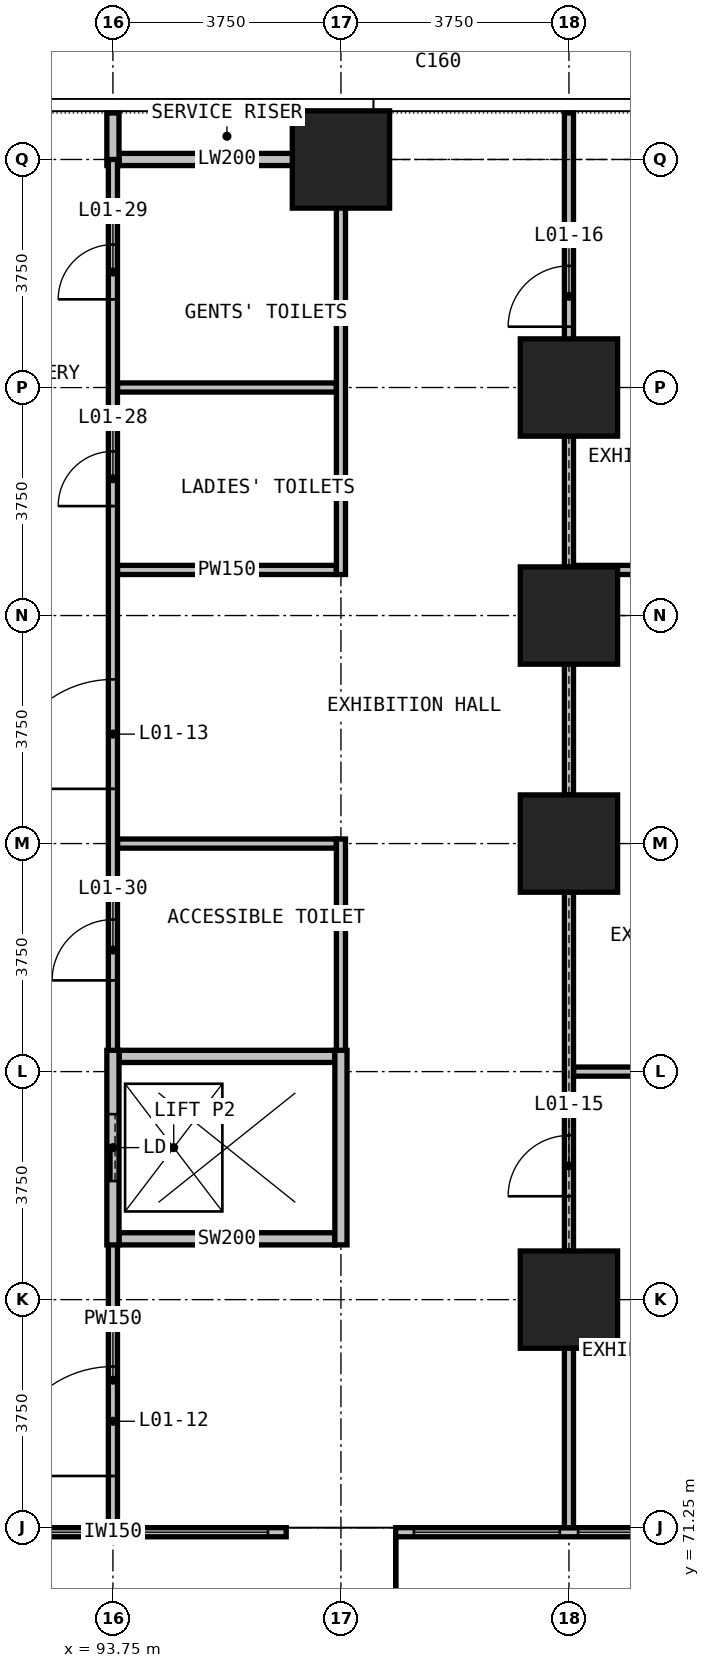
"""IFC4 building model, lengths in metres.
Left out: names, types, materials, properties, quantities, classifications, styles, units other than length and angle.
Written with IfcOpenShell. Run it as: python <this file> out.ifc"""

import sys

from ifc_helpers import new_model, si_unit, direction, frame, frame_2d, origin, origin_2d, place, context, subcontext, project, spatial, polyline, rectangle, outline, extrude, element, fill, save


model = new_model("IFC4")
c1 = context("Model", 3, precision=1e-05, world=origin(), true_north=direction((0.0, 1.0)))
c2 = subcontext(c1, "Body", "Model", "MODEL_VIEW")
j1 = project(units=[si_unit("LENGTHUNIT", "METRE"), si_unit("PLANEANGLEUNIT", "RADIAN")], contexts=[c1])
p1 = place(None, origin())
s1 = spatial("IfcSite", under=j1, at=p1, CompositionType="ELEMENT")
p2 = place(p1, origin())
s2 = spatial("IfcBuilding", under=s1, at=p2, CompositionType="ELEMENT")
p3 = place(p2, frame((0.0, 0.0, 7.5)))
s3 = spatial("IfcBuildingStorey", under=s2, at=p3, CompositionType="ELEMENT", Elevation=7.5)
p4 = place(p3, frame((98.4, 66.562, 0.84), z_axis=(1.0, 0.0, 0.0), x_axis=(0.0, 0.371855891589, -0.928290469568)))
e1 = element("IfcWall", 1, at=p4, inside=s3, PredefinedType="SHEAR", context=c2, shape_type="SweptSolid", body=[
    extrude(outline(polyline([(0.0, 0.0), (0.905, 0.0), (2.523, 4.039), (-5.832, 7.386), (-9.19, -0.996), (-8.194, -0.757), (-6.429, -0.454), (-4.475, -0.227), (-2.332, -0.076), (0.0, 0.0)])), origin(), (0.0, 0.0, -1.0), 1.8),
])
for number, where, z_axis, x_axis in (
    (2, (97.5, 93.75, 0.0), (0.0, 0.0, 1.0), (1.0, 0.0, 0.0)),
    (3, (101.25, 75.0, 0.0), (0.0, 0.0, 1.0), (1.0, 0.0, 0.0)),
    (4, (101.25, 82.5, 0.0), (0.0, 0.0, 1.0), (1.0, 0.0, 0.0)),
    (5, (101.25, 86.25, 0.0), (0.0, 0.0, 1.0), (1.0, 0.0, 0.0)),
    (6, (101.25, 90.0, 0.0), (0.0, 0.0, 1.0), (1.0, 0.0, 0.0)),
):
    element("IfcColumn", number, at=place(p3, frame(where, z_axis=z_axis, x_axis=x_axis)), inside=s3, PredefinedType="COLUMN", context=c2, shape_type="SweptSolid", body=[
        extrude(rectangle(XDim=1.6, YDim=1.6, at=origin_2d()), origin(), (0.0, 0.0, 1.0), 9.0),
    ])
p5 = place(p3, frame((90.9, 71.175, 0.0), z_axis=(0.0, 0.0, 1.0), x_axis=(1.0, 0.0, 0.0)))
e7 = element("IfcWall", 7, at=p5, inside=s3, PredefinedType="SOLIDWALL", context=c2, shape_type="SweptSolid", body=[
    extrude(rectangle(XDim=5.7, YDim=0.15, at=frame_2d((2.85, 0.0))), origin(), (0.0, 0.0, 1.0), 8.65),
])
p6 = place(p5, frame((0.3, 0.0, 0.9)))
e8 = element("IfcOpeningElement", 8, at=p6, cuts=e7, PredefinedType="OPENING", context=c2, shape_type="SweptSolid", body=[
    extrude(rectangle(XDim=2.4, YDim=3.6, at=frame_2d((1.2, 1.8))), frame((0.0, 0.085, 0.0), z_axis=(0.0, -1.0, 0.0), x_axis=(1.0, 0.0, 0.0)), (0.0, 0.0, 1.0), 0.17),
])
p7 = place(p5, frame((3.0, 0.0, 0.9)))
e9 = element("IfcOpeningElement", 9, at=p7, cuts=e7, PredefinedType="OPENING", context=c2, shape_type="SweptSolid", body=[
    extrude(rectangle(XDim=2.4, YDim=3.6, at=frame_2d((1.2, 1.8))), frame((0.0, 0.085, 0.0), z_axis=(0.0, -1.0, 0.0), x_axis=(1.0, 0.0, 0.0)), (0.0, 0.0, 1.0), 0.17),
])
p8 = place(p3, frame((98.4, 71.175, 0.0), z_axis=(0.0, 0.0, 1.0), x_axis=(1.0, 0.0, 0.0)))
e10 = element("IfcWall", 10, at=p8, inside=s3, PredefinedType="SOLIDWALL", context=c2, shape_type="SweptSolid", body=[
    extrude(rectangle(XDim=5.7, YDim=0.15, at=frame_2d((2.85, 0.0))), origin(), (0.0, 0.0, 1.0), 8.65),
])
p9 = place(p8, frame((0.3, 0.0, 0.9)))
e11 = element("IfcOpeningElement", 11, at=p9, cuts=e10, PredefinedType="OPENING", context=c2, shape_type="SweptSolid", body=[
    extrude(rectangle(XDim=2.4, YDim=3.6, at=frame_2d((1.2, 1.8))), frame((0.0, 0.085, 0.0), z_axis=(0.0, -1.0, 0.0), x_axis=(1.0, 0.0, 0.0)), (0.0, 0.0, 1.0), 0.17),
])
p10 = place(p8, frame((3.0, 0.0, 0.9)))
e12 = element("IfcOpeningElement", 12, at=p10, cuts=e10, PredefinedType="OPENING", context=c2, shape_type="SweptSolid", body=[
    extrude(rectangle(XDim=2.4, YDim=3.6, at=frame_2d((1.2, 1.8))), frame((0.0, 0.085, 0.0), z_axis=(0.0, -1.0, 0.0), x_axis=(1.0, 0.0, 0.0)), (0.0, 0.0, 1.0), 0.17),
])
p11 = place(p3, frame((93.85, 93.75, 0.0), z_axis=(0.0, 0.0, 1.0), x_axis=(1.0, 0.0, 0.0)))
e13 = element("IfcWall", 13, at=p11, inside=s3, PredefinedType="PARTITIONING", context=c2, shape_type="SweptSolid", body=[
    extrude(rectangle(XDim=3.55, YDim=0.2, at=frame_2d((1.775, 0.0))), origin(), (0.0, 0.0, 1.0), 8.65),
])
for number, where, z_axis, x_axis in (
    (14, (93.75, 93.65, 0.0), (0.0, 0.0, 1.0), (0.0, 1.0, 0.0)),
    (15, (97.5, 93.65, 0.0), (0.0, 0.0, 1.0), (0.0, 1.0, 0.0)),
):
    element("IfcWall", number, at=place(p3, frame(where, z_axis=z_axis, x_axis=x_axis)), inside=s3, PredefinedType="PARTITIONING", context=c2, shape_type="SweptSolid", body=[
        extrude(rectangle(XDim=0.865, YDim=0.2, at=frame_2d((0.433, 0.0))), origin(), (0.0, 0.0, 1.0), 8.65),
    ])
p12 = place(p3, frame((101.325, 78.75, 0.0), z_axis=(0.0, 0.0, 1.0), x_axis=(1.0, 0.0, 0.0)))
e16 = element("IfcWall", 16, at=p12, inside=s3, PredefinedType="PARTITIONING", context=c2, shape_type="SweptSolid", body=[
    extrude(rectangle(XDim=5.05, YDim=0.15, at=frame_2d((2.525, 0.0))), origin(), (0.0, 0.0, 1.0), 8.65),
])
for number, where, z_axis, x_axis in (
    (17, (93.825, 82.5, 0.0), (0.0, 0.0, 1.0), (1.0, 0.0, 0.0)),
    (18, (93.825, 87.0, 0.0), (0.0, 0.0, 1.0), (1.0, 0.0, 0.0)),
):
    element("IfcWall", number, at=place(p3, frame(where, z_axis=z_axis, x_axis=x_axis)), inside=s3, PredefinedType="PARTITIONING", context=c2, shape_type="SweptSolid", body=[
        extrude(rectangle(XDim=3.6, YDim=0.15, at=frame_2d((1.8, 0.0))), origin(), (0.0, 0.0, 1.0), 8.65),
    ])
p13 = place(p3, frame((101.325, 87.0, 0.0), z_axis=(0.0, 0.0, 1.0), x_axis=(1.0, 0.0, 0.0)))
e19 = element("IfcWall", 19, at=p13, inside=s3, PredefinedType="PARTITIONING", context=c2, shape_type="SweptSolid", body=[
    extrude(rectangle(XDim=3.575, YDim=0.15, at=frame_2d((1.788, 0.0))), origin(), (0.0, 0.0, 1.0), 8.65),
])
p14 = place(p3, frame((93.825, 90.0, 0.0), z_axis=(0.0, 0.0, 1.0), x_axis=(1.0, 0.0, 0.0)))
e20 = element("IfcWall", 20, at=p14, inside=s3, PredefinedType="PARTITIONING", context=c2, shape_type="SweptSolid", body=[
    extrude(rectangle(XDim=3.6, YDim=0.15, at=frame_2d((1.8, 0.0))), origin(), (0.0, 0.0, 1.0), 8.65),
])
p15 = place(p3, frame((93.75, 71.25, 0.0), z_axis=(0.0, 0.0, 1.0), x_axis=(0.0, 1.0, 0.0)))
e21 = element("IfcWall", 21, at=p15, inside=s3, PredefinedType="PARTITIONING", context=c2, shape_type="SweptSolid", body=[
    extrude(rectangle(XDim=4.85, YDim=0.15, at=frame_2d((2.425, 0.0))), origin(), (0.0, 0.0, 1.0), 8.65),
])
p16 = place(p15, frame((0.85, 0.0, 0.0)))
e22 = element("IfcOpeningElement", 22, at=p16, cuts=e21, PredefinedType="OPENING", context=c2, shape_type="SweptSolid", body=[
    extrude(rectangle(XDim=1.8, YDim=2.2, at=frame_2d((0.9, 1.1))), frame((0.0, 0.085, 0.0), z_axis=(0.0, -1.0, 0.0), x_axis=(1.0, 0.0, 0.0)), (0.0, 0.0, 1.0), 0.17),
])
p17 = place(p3, frame((93.75, 78.9, 0.0), z_axis=(0.0, 0.0, 1.0), x_axis=(0.0, 1.0, 0.0)))
e23 = element("IfcWall", 23, at=p17, inside=s3, PredefinedType="PARTITIONING", context=c2, shape_type="SweptSolid", body=[
    extrude(rectangle(XDim=14.85, YDim=0.15, at=frame_2d((7.425, 0.0))), origin(), (0.0, 0.0, 1.0), 8.65),
])
p18 = place(p17, frame((4.5, 0.0, 0.0)))
e24 = element("IfcOpeningElement", 24, at=p18, cuts=e23, PredefinedType="OPENING", context=c2, shape_type="SweptSolid", body=[
    extrude(rectangle(XDim=1.8, YDim=2.2, at=frame_2d((0.9, 1.1))), frame((0.0, 0.085, 0.0), z_axis=(0.0, -1.0, 0.0), x_axis=(1.0, 0.0, 0.0)), (0.0, 0.0, 1.0), 0.17),
])
p19 = place(p17, frame((9.15, 0.0, 0.0)))
e25 = element("IfcOpeningElement", 25, at=p19, cuts=e23, PredefinedType="OPENING", context=c2, shape_type="SweptSolid", body=[
    extrude(rectangle(XDim=0.9, YDim=2.2, at=frame_2d((0.45, 1.1))), frame((0.0, 0.085, 0.0), z_axis=(0.0, -1.0, 0.0), x_axis=(1.0, 0.0, 0.0)), (0.0, 0.0, 1.0), 0.17),
])
p20 = place(p17, frame((12.55, 0.0, 0.0)))
e26 = element("IfcOpeningElement", 26, at=p20, cuts=e23, PredefinedType="OPENING", context=c2, shape_type="SweptSolid", body=[
    extrude(rectangle(XDim=0.9, YDim=2.2, at=frame_2d((0.45, 1.1))), frame((0.0, 0.085, 0.0), z_axis=(0.0, -1.0, 0.0), x_axis=(1.0, 0.0, 0.0)), (0.0, 0.0, 1.0), 0.17),
])
p21 = place(p17, frame((1.35, 0.0, 0.0)))
e27 = element("IfcOpeningElement", 27, at=p21, cuts=e23, PredefinedType="OPENING", context=c2, shape_type="SweptSolid", body=[
    extrude(rectangle(XDim=1.0, YDim=2.2, at=frame_2d((0.5, 1.1))), frame((0.0, 0.085, 0.0), z_axis=(0.0, -1.0, 0.0), x_axis=(1.0, 0.0, 0.0)), (0.0, 0.0, 1.0), 0.17),
])
p22 = place(p3, frame((97.5, 78.9, 0.0), z_axis=(0.0, 0.0, 1.0), x_axis=(0.0, 1.0, 0.0)))
e28 = element("IfcWall", 28, at=p22, inside=s3, PredefinedType="PARTITIONING", context=c2, shape_type="SweptSolid", body=[
    extrude(rectangle(XDim=3.675, YDim=0.15, at=frame_2d((1.837, 0.0))), origin(), (0.0, 0.0, 1.0), 8.65),
])
p23 = place(p3, frame((97.5, 86.925, 0.0), z_axis=(0.0, 0.0, 1.0), x_axis=(0.0, 1.0, 0.0)))
e29 = element("IfcWall", 29, at=p23, inside=s3, PredefinedType="PARTITIONING", context=c2, shape_type="SweptSolid", body=[
    extrude(rectangle(XDim=6.825, YDim=0.15, at=frame_2d((3.413, 0.0))), origin(), (0.0, 0.0, 1.0), 8.65),
])
p24 = place(p3, frame((101.25, 71.25, 0.0), z_axis=(0.0, 0.0, 1.0), x_axis=(0.0, 1.0, 0.0)))
e30 = element("IfcWall", 30, at=p24, inside=s3, PredefinedType="PARTITIONING", context=c2, shape_type="SweptSolid", body=[
    extrude(rectangle(XDim=4.549, YDim=0.15, at=frame_2d((2.274, 0.0))), origin(), (0.0, 0.0, 1.0), 8.65),
])
p25 = place(p3, frame((101.25, 75.799, 0.0), z_axis=(0.0, 0.0, 1.0), x_axis=(0.0, 1.0, 0.0)))
e31 = element("IfcWall", 31, at=p25, inside=s3, PredefinedType="PARTITIONING", context=c2, shape_type="SweptSolid", body=[
    extrude(rectangle(XDim=5.902, YDim=0.15, at=frame_2d((2.951, 0.0))), origin(), (0.0, 0.0, 1.0), 7.85),
])
p26 = place(p25, frame((0.901, 0.0, 0.0)))
e32 = element("IfcOpeningElement", 32, at=p26, cuts=e31, PredefinedType="OPENING", context=c2, shape_type="SweptSolid", body=[
    extrude(rectangle(XDim=1.0, YDim=2.2, at=frame_2d((0.5, 1.1))), frame((0.0, 0.085, 0.0), z_axis=(0.0, -1.0, 0.0), x_axis=(1.0, 0.0, 0.0)), (0.0, 0.0, 1.0), 0.17),
])
p27 = place(p3, frame((101.25, 81.701, 0.0), z_axis=(0.0, 0.0, 1.0), x_axis=(0.0, 1.0, 0.0)))
e33 = element("IfcWall", 33, at=p27, inside=s3, PredefinedType="PARTITIONING", context=c2, shape_type="SweptSolid", body=[
    extrude(rectangle(XDim=1.598, YDim=0.15, at=frame_2d((0.799, 0.0))), origin(), (0.0, 0.0, 1.0), 8.65),
])
p28 = place(p3, frame((101.25, 83.299, 0.0), z_axis=(0.0, 0.0, 1.0), x_axis=(0.0, 1.0, 0.0)))
e34 = element("IfcWall", 34, at=p28, inside=s3, PredefinedType="PARTITIONING", context=c2, shape_type="SweptSolid", body=[
    extrude(rectangle(XDim=2.152, YDim=0.15, at=frame_2d((1.076, 0.0))), origin(), (0.0, 0.0, 1.0), 7.85),
])
p29 = place(p3, frame((101.25, 85.451, 0.0), z_axis=(0.0, 0.0, 1.0), x_axis=(0.0, 1.0, 0.0)))
e35 = element("IfcWall", 35, at=p29, inside=s3, PredefinedType="PARTITIONING", context=c2, shape_type="SweptSolid", body=[
    extrude(rectangle(XDim=1.598, YDim=0.15, at=frame_2d((0.799, 0.0))), origin(), (0.0, 0.0, 1.0), 8.65),
])
p30 = place(p3, frame((101.25, 87.049, 0.0), z_axis=(0.0, 0.0, 1.0), x_axis=(0.0, 1.0, 0.0)))
e36 = element("IfcWall", 36, at=p30, inside=s3, PredefinedType="PARTITIONING", context=c2, shape_type="SweptSolid", body=[
    extrude(rectangle(XDim=2.152, YDim=0.15, at=frame_2d((1.076, 0.0))), origin(), (0.0, 0.0, 1.0), 7.85),
])
p31 = place(p3, frame((101.25, 89.201, 0.0), z_axis=(0.0, 0.0, 1.0), x_axis=(0.0, 1.0, 0.0)))
e37 = element("IfcWall", 37, at=p31, inside=s3, PredefinedType="PARTITIONING", context=c2, shape_type="SweptSolid", body=[
    extrude(rectangle(XDim=5.314, YDim=0.15, at=frame_2d((2.657, 0.0))), origin(), (0.0, 0.0, 1.0), 8.65),
])
p32 = place(p31, frame((1.799, 0.0, 0.0)))
e38 = element("IfcOpeningElement", 38, at=p32, cuts=e37, PredefinedType="OPENING", context=c2, shape_type="SweptSolid", body=[
    extrude(rectangle(XDim=1.0, YDim=2.2, at=frame_2d((0.5, 1.1))), frame((0.0, 0.085, 0.0), z_axis=(0.0, -1.0, 0.0), x_axis=(1.0, 0.0, 0.0)), (0.0, 0.0, 1.0), 0.17),
])
for number, where, z_axis, x_axis in (
    (39, (93.85, 76.0, 0.0), (0.0, 0.0, 1.0), (1.0, 0.0, 0.0)),
    (40, (93.85, 79.0, 0.0), (0.0, 0.0, 1.0), (1.0, 0.0, 0.0)),
):
    element("IfcWall", number, at=place(p3, frame(where, z_axis=z_axis, x_axis=x_axis)), inside=s3, PredefinedType="PARTITIONING", context=c2, shape_type="SweptSolid", body=[
        extrude(rectangle(XDim=3.55, YDim=0.2, at=frame_2d((1.775, 0.0))), origin(), (0.0, 0.0, 1.0), 8.65),
    ])
p33 = place(p3, frame((93.75, 75.9, 0.0), z_axis=(0.0, 0.0, 1.0), x_axis=(0.0, 1.0, 0.0)))
e41 = element("IfcWall", 41, at=p33, inside=s3, PredefinedType="PARTITIONING", context=c2, shape_type="SweptSolid", body=[
    extrude(rectangle(XDim=3.2, YDim=0.2, at=frame_2d((1.6, 0.0))), origin(), (0.0, 0.0, 1.0), 8.65),
])
p34 = place(p33, frame((1.05, 0.0, 0.0)))
e42 = element("IfcOpeningElement", 42, at=p34, cuts=e41, PredefinedType="OPENING", context=c2, shape_type="SweptSolid", body=[
    extrude(rectangle(XDim=1.1, YDim=2.2, at=frame_2d((0.55, 1.1))), frame((0.0, 0.11, 0.0), z_axis=(0.0, -1.0, 0.0), x_axis=(1.0, 0.0, 0.0)), (0.0, 0.0, 1.0), 0.22),
])
p35 = place(p3, frame((97.5, 75.9, 0.0), z_axis=(0.0, 0.0, 1.0), x_axis=(0.0, 1.0, 0.0)))
e43 = element("IfcWall", 43, at=p35, inside=s3, PredefinedType="PARTITIONING", context=c2, shape_type="SweptSolid", body=[
    extrude(rectangle(XDim=3.2, YDim=0.2, at=frame_2d((1.6, 0.0))), origin(), (0.0, 0.0, 1.0), 8.65),
])
p36 = place(p6, origin())
e44 = element("IfcWindow", 44, at=p36, inside=s3, PartitioningType="SINGLE_PANEL", PredefinedType="WINDOW", context=c2, shape_type="SweptSolid", body=[
    extrude(rectangle(XDim=2.4, YDim=3.6, at=frame_2d((1.2, 1.8))), frame((0.0, 0.03, 0.0), z_axis=(0.0, -1.0, 0.0), x_axis=(1.0, 0.0, 0.0)), (0.0, 0.0, 1.0), 0.06),
])
fill(e8, e44)
p37 = place(p7, origin())
e45 = element("IfcWindow", 45, at=p37, inside=s3, PartitioningType="SINGLE_PANEL", PredefinedType="WINDOW", context=c2, shape_type="SweptSolid", body=[
    extrude(rectangle(XDim=2.4, YDim=3.6, at=frame_2d((1.2, 1.8))), frame((0.0, 0.03, 0.0), z_axis=(0.0, -1.0, 0.0), x_axis=(1.0, 0.0, 0.0)), (0.0, 0.0, 1.0), 0.06),
])
fill(e9, e45)
p38 = place(p9, origin())
e46 = element("IfcWindow", 46, at=p38, inside=s3, PartitioningType="SINGLE_PANEL", PredefinedType="WINDOW", context=c2, shape_type="SweptSolid", body=[
    extrude(rectangle(XDim=2.4, YDim=3.6, at=frame_2d((1.2, 1.8))), frame((0.0, 0.03, 0.0), z_axis=(0.0, -1.0, 0.0), x_axis=(1.0, 0.0, 0.0)), (0.0, 0.0, 1.0), 0.06),
])
fill(e11, e46)
p39 = place(p10, origin())
e47 = element("IfcWindow", 47, at=p39, inside=s3, PartitioningType="SINGLE_PANEL", PredefinedType="WINDOW", context=c2, shape_type="SweptSolid", body=[
    extrude(rectangle(XDim=2.4, YDim=3.6, at=frame_2d((1.2, 1.8))), frame((0.0, 0.03, 0.0), z_axis=(0.0, -1.0, 0.0), x_axis=(1.0, 0.0, 0.0)), (0.0, 0.0, 1.0), 0.06),
])
fill(e12, e47)
p40 = place(p34, origin())
e48 = element("IfcDoor", 48, at=p40, inside=s3, OperationType="DOUBLE_DOOR_SLIDING", PredefinedType="DOOR", context=c2, shape_type="SweptSolid", body=[
    extrude(rectangle(XDim=1.1, YDim=2.2, at=frame_2d((0.55, 1.1))), frame((0.0, 0.025, 0.0), z_axis=(0.0, -1.0, 0.0), x_axis=(1.0, 0.0, 0.0)), (0.0, 0.0, 1.0), 0.05),
])
fill(e42, e48)
p41 = place(p16, origin())
e49 = element("IfcDoor", 49, at=p41, inside=s3, OperationType="DOUBLE_DOOR_SINGLE_SWING", PredefinedType="DOOR", context=c2, shape_type="SweptSolid", body=[
    extrude(rectangle(XDim=1.8, YDim=2.2, at=frame_2d((0.9, 1.1))), frame((0.0, 0.025, 0.0), z_axis=(0.0, -1.0, 0.0), x_axis=(1.0, 0.0, 0.0)), (0.0, 0.0, 1.0), 0.05),
])
fill(e22, e49)
p42 = place(p18, origin())
e50 = element("IfcDoor", 50, at=p42, inside=s3, OperationType="DOUBLE_DOOR_SINGLE_SWING", PredefinedType="DOOR", context=c2, shape_type="SweptSolid", body=[
    extrude(rectangle(XDim=1.8, YDim=2.2, at=frame_2d((0.9, 1.1))), frame((0.0, 0.025, 0.0), z_axis=(0.0, -1.0, 0.0), x_axis=(1.0, 0.0, 0.0)), (0.0, 0.0, 1.0), 0.05),
])
fill(e24, e50)
p43 = place(p26, origin())
e51 = element("IfcDoor", 51, at=p43, inside=s3, OperationType="SINGLE_SWING_LEFT", PredefinedType="DOOR", context=c2, shape_type="SweptSolid", body=[
    extrude(rectangle(XDim=1.0, YDim=2.2, at=frame_2d((0.5, 1.1))), frame((0.0, 0.025, 0.0), z_axis=(0.0, -1.0, 0.0), x_axis=(1.0, 0.0, 0.0)), (0.0, 0.0, 1.0), 0.05),
])
fill(e32, e51)
p44 = place(p32, origin())
e52 = element("IfcDoor", 52, at=p44, inside=s3, OperationType="SINGLE_SWING_RIGHT", PredefinedType="DOOR", context=c2, shape_type="SweptSolid", body=[
    extrude(rectangle(XDim=1.0, YDim=2.2, at=frame_2d((0.5, 1.1))), frame((0.0, 0.025, 0.0), z_axis=(0.0, -1.0, 0.0), x_axis=(1.0, 0.0, 0.0)), (0.0, 0.0, 1.0), 0.05),
])
fill(e38, e52)
p45 = place(p19, origin())
e53 = element("IfcDoor", 53, at=p45, inside=s3, OperationType="SINGLE_SWING_LEFT", PredefinedType="DOOR", context=c2, shape_type="SweptSolid", body=[
    extrude(rectangle(XDim=0.9, YDim=2.2, at=frame_2d((0.45, 1.1))), frame((0.0, 0.025, 0.0), z_axis=(0.0, -1.0, 0.0), x_axis=(1.0, 0.0, 0.0)), (0.0, 0.0, 1.0), 0.05),
])
fill(e25, e53)
p46 = place(p20, origin())
e54 = element("IfcDoor", 54, at=p46, inside=s3, OperationType="SINGLE_SWING_RIGHT", PredefinedType="DOOR", context=c2, shape_type="SweptSolid", body=[
    extrude(rectangle(XDim=0.9, YDim=2.2, at=frame_2d((0.45, 1.1))), frame((0.0, 0.025, 0.0), z_axis=(0.0, -1.0, 0.0), x_axis=(1.0, 0.0, 0.0)), (0.0, 0.0, 1.0), 0.05),
])
fill(e26, e54)
p47 = place(p21, origin())
e55 = element("IfcDoor", 55, at=p47, inside=s3, OperationType="SINGLE_SWING_RIGHT", PredefinedType="DOOR", context=c2, shape_type="SweptSolid", body=[
    extrude(rectangle(XDim=1.0, YDim=2.2, at=frame_2d((0.5, 1.1))), frame((0.0, 0.025, 0.0), z_axis=(0.0, -1.0, 0.0), x_axis=(1.0, 0.0, 0.0)), (0.0, 0.0, 1.0), 0.05),
])
fill(e27, e55)
save(model, sys.argv[1])
